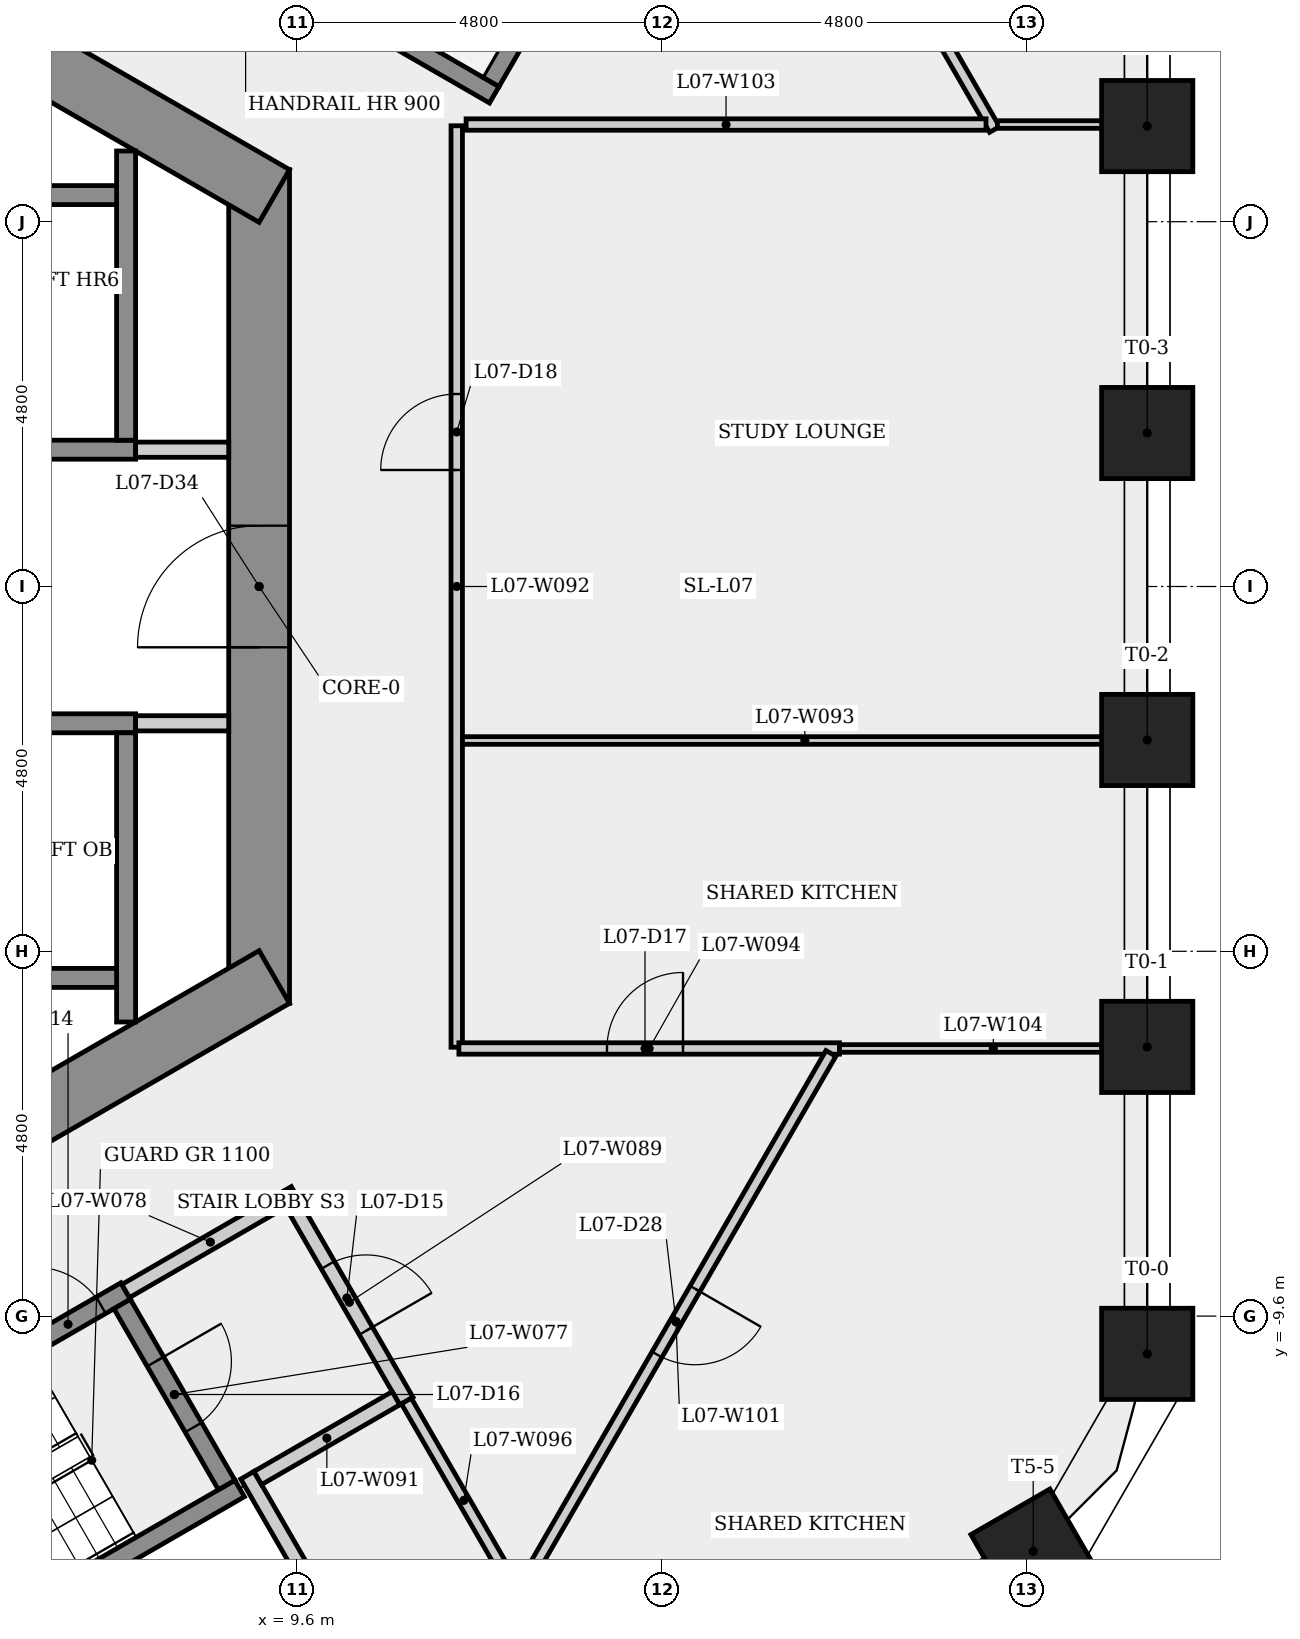
"""IFC4 building model, lengths in metres.
Left out: names, types, materials, properties, quantities, classifications, styles, units other than length and angle.
Written with IfcOpenShell. Run it as: python <this file> out.ifc"""

import sys

from ifc_helpers import new_model, si_unit, direction, frame, frame_2d, origin, origin_2d, place, context, subcontext, project, spatial, rectangle, extrude, element, fill, save


model = new_model("IFC4")
c1 = context("Model", 3, precision=1e-05, world=origin(), true_north=direction((0.0, 1.0)))
c2 = subcontext(c1, "Body", "Model", "MODEL_VIEW")
j1 = project(units=[si_unit("LENGTHUNIT", "METRE"), si_unit("PLANEANGLEUNIT", "RADIAN")], contexts=[c1])
p1 = place(None, origin())
s1 = spatial("IfcSite", under=j1, at=p1, CompositionType="ELEMENT")
p2 = place(p1, origin())
s2 = spatial("IfcBuilding", under=s1, at=p2, CompositionType="ELEMENT")
p3 = place(p2, frame((0.0, 0.0, 32.3)))
s3 = spatial("IfcBuildingStorey", under=s2, at=p3, CompositionType="ELEMENT", Elevation=32.3)
p4 = place(p3, frame((9.1, -5.485, 0.0), z_axis=(0.0, 0.0, 1.0), x_axis=(0.0, 1.0, 0.0)))
e1 = element("IfcWall", 1, at=p4, inside=s3, PredefinedType="SHEAR", context=c2, shape_type="SweptSolid", body=[
    extrude(rectangle(XDim=10.97, YDim=0.8, at=frame_2d((5.485, 0.0))), origin(), (0.0, 0.0, 1.0), 3.4),
])
p5 = place(p4, frame((4.685, 0.0, 0.0)))
e2 = element("IfcOpeningElement", 2, at=p5, cuts=e1, PredefinedType="OPENING", context=c2, shape_type="SweptSolid", body=[
    extrude(rectangle(XDim=1.6, YDim=2.1, at=frame_2d((0.8, 1.05))), frame((0.0, 0.41, 0.0), z_axis=(0.0, -1.0, 0.0), x_axis=(1.0, 0.0, 0.0)), (0.0, 0.0, 1.0), 0.82),
])
p6 = place(p3, frame((9.3, 5.138, 0.0), z_axis=(0.0, 0.0, 1.0), x_axis=(-0.866023993627, 0.500002442456, 0.0)))
e3 = element("IfcWall", 3, at=p6, inside=s3, PredefinedType="SHEAR", context=c2, shape_type="SweptSolid", body=[
    extrude(rectangle(XDim=10.97, YDim=0.8, at=frame_2d((5.485, 0.0))), origin(), (0.0, 0.0, 1.0), 3.4),
])
p7 = place(p6, frame((5.509, 0.0, 0.0)))
e4 = element("IfcOpeningElement", 4, at=p7, cuts=e3, PredefinedType="OPENING", context=c2, shape_type="SweptSolid", body=[
    extrude(rectangle(XDim=0.9, YDim=2.1, at=frame_2d((0.45, 1.05))), frame((0.0, 0.41, 0.0), z_axis=(0.0, -1.0, 0.0), x_axis=(1.0, 0.0, 0.0)), (0.0, 0.0, 1.0), 0.82),
])
p8 = place(p3, frame((-0.2, -10.623, 0.0), z_axis=(0.0, 0.0, 1.0), x_axis=(0.866023993627, 0.500002442456, 0.0)))
e5 = element("IfcWall", 5, at=p8, inside=s3, PredefinedType="SHEAR", context=c2, shape_type="SweptSolid", body=[
    extrude(rectangle(XDim=10.97, YDim=0.8, at=frame_2d((5.485, 0.0))), origin(), (0.0, 0.0, 1.0), 3.4),
])
p9 = place(p8, frame((4.914, 0.0, 0.0)))
e6 = element("IfcOpeningElement", 6, at=p9, cuts=e5, PredefinedType="OPENING", context=c2, shape_type="SweptSolid", body=[
    extrude(rectangle(XDim=0.9, YDim=2.1, at=frame_2d((0.45, 1.05))), frame((0.0, 0.41, 0.0), z_axis=(0.0, -1.0, 0.0), x_axis=(1.0, 0.0, 0.0)), (0.0, 0.0, 1.0), 0.82),
])
for number, where, z_axis, x_axis in (
    (7, (20.785, -10.097, 0.0), (0.0, 0.0, 1.0), (1.0, 0.0, 0.0)),
    (8, (20.785, -6.058, 0.0), (0.0, 0.0, 1.0), (1.0, 0.0, 0.0)),
    (9, (20.785, -2.019, 0.0), (0.0, 0.0, 1.0), (1.0, 0.0, 0.0)),
    (10, (20.785, 2.019, 0.0), (0.0, 0.0, 1.0), (1.0, 0.0, 0.0)),
    (11, (20.785, 6.058, 0.0), (0.0, 0.0, 1.0), (1.0, 0.0, 0.0)),
    (12, (19.285, -12.695, 0.0), (0.0, 0.0, 1.0), (0.5, -0.866, 0.0)),
):
    element("IfcColumn", number, at=place(p3, frame(where, z_axis=z_axis, x_axis=x_axis)), inside=s3, PredefinedType="COLUMN", context=c2, shape_type="SweptSolid", body=[
        extrude(rectangle(XDim=1.2, YDim=1.2, at=origin_2d()), origin(), (0.0, 0.0, 1.0), 3.4),
    ])
p10 = place(p3, frame((-7.475, 1.8, 0.0), z_axis=(0.0, 0.0, 1.0), x_axis=(1.0, 0.0, 0.0)))
e13 = element("IfcWall", 13, at=p10, inside=s3, PredefinedType="SHEAR", context=c2, shape_type="SweptSolid", body=[
    extrude(rectangle(XDim=14.95, YDim=0.25, at=frame_2d((7.475, 0.0))), origin(), (0.0, 0.0, 1.0), 3.05),
])
for number, where, z_axis, x_axis in (
    (14, (-7.225, 5.15, 0.0), (0.0, 0.0, 1.0), (1.0, 0.0, 0.0)),
    (15, (-7.225, -5.15, 0.0), (0.0, 0.0, 1.0), (1.0, 0.0, 0.0)),
):
    element("IfcWall", number, at=place(p3, frame(where, z_axis=z_axis, x_axis=x_axis)), inside=s3, PredefinedType="SHEAR", context=c2, shape_type="SweptSolid", body=[
        extrude(rectangle(XDim=14.7, YDim=0.25, at=frame_2d((7.35, 0.0))), origin(), (0.0, 0.0, 1.0), 3.05),
    ])
p11 = place(p3, frame((-7.225, -1.8, 0.0), z_axis=(0.0, 0.0, 1.0), x_axis=(1.0, 0.0, 0.0)))
e16 = element("IfcWall", 16, at=p11, inside=s3, PredefinedType="SHEAR", context=c2, shape_type="SweptSolid", body=[
    extrude(rectangle(XDim=14.7, YDim=0.25, at=frame_2d((7.35, 0.0))), origin(), (0.0, 0.0, 1.0), 3.05),
])
p12 = place(p11, frame((0.597, 0.0, 0.0)))
e17 = element("IfcOpeningElement", 17, at=p12, cuts=e16, PredefinedType="OPENING", context=c2, shape_type="SweptSolid", body=[
    extrude(rectangle(XDim=1.1, YDim=2.1, at=frame_2d((0.55, 1.05))), frame((0.0, 0.135, 0.0), z_axis=(0.0, -1.0, 0.0), x_axis=(1.0, 0.0, 0.0)), (0.0, 0.0, 1.0), 0.27),
])
p13 = place(p11, frame((3.0, 0.0, 0.0)))
e18 = element("IfcOpeningElement", 18, at=p13, cuts=e16, PredefinedType="OPENING", context=c2, shape_type="SweptSolid", body=[
    extrude(rectangle(XDim=1.1, YDim=2.1, at=frame_2d((0.55, 1.05))), frame((0.0, 0.135, 0.0), z_axis=(0.0, -1.0, 0.0), x_axis=(1.0, 0.0, 0.0)), (0.0, 0.0, 1.0), 0.27),
])
p14 = place(p11, frame((5.45, 0.0, 0.0)))
e19 = element("IfcOpeningElement", 19, at=p14, cuts=e16, PredefinedType="OPENING", context=c2, shape_type="SweptSolid", body=[
    extrude(rectangle(XDim=1.1, YDim=2.1, at=frame_2d((0.55, 1.05))), frame((0.0, 0.135, 0.0), z_axis=(0.0, -1.0, 0.0), x_axis=(1.0, 0.0, 0.0)), (0.0, 0.0, 1.0), 0.27),
])
p15 = place(p11, frame((7.9, 0.0, 0.0)))
e20 = element("IfcOpeningElement", 20, at=p15, cuts=e16, PredefinedType="OPENING", context=c2, shape_type="SweptSolid", body=[
    extrude(rectangle(XDim=1.1, YDim=2.1, at=frame_2d((0.55, 1.05))), frame((0.0, 0.135, 0.0), z_axis=(0.0, -1.0, 0.0), x_axis=(1.0, 0.0, 0.0)), (0.0, 0.0, 1.0), 0.27),
])
p16 = place(p11, frame((10.35, 0.0, 0.0)))
e21 = element("IfcOpeningElement", 21, at=p16, cuts=e16, PredefinedType="OPENING", context=c2, shape_type="SweptSolid", body=[
    extrude(rectangle(XDim=1.1, YDim=2.1, at=frame_2d((0.55, 1.05))), frame((0.0, 0.135, 0.0), z_axis=(0.0, -1.0, 0.0), x_axis=(1.0, 0.0, 0.0)), (0.0, 0.0, 1.0), 0.27),
])
p17 = place(p3, frame((1.585, -12.595, 0.0), z_axis=(0.0, 0.0, 1.0), x_axis=(0.866036417653, 0.499980922934, 0.0)))
e22 = element("IfcWall", 22, at=p17, inside=s3, PredefinedType="SHEAR", context=c2, shape_type="SweptSolid", body=[
    extrude(rectangle(XDim=6.65, YDim=0.25, at=frame_2d((3.325, 0.0))), origin(), (0.0, 0.0, 1.0), 3.05),
])
p18 = place(p17, frame((5.275, 0.0, 0.0)))
e23 = element("IfcOpeningElement", 23, at=p18, cuts=e22, PredefinedType="OPENING", context=c2, shape_type="SweptSolid", body=[
    extrude(rectangle(XDim=1.0, YDim=2.1, at=frame_2d((0.5, 1.05))), frame((0.0, 0.135, 0.0), z_axis=(0.0, -1.0, 0.0), x_axis=(1.0, 0.0, 0.0)), (0.0, 0.0, 1.0), 0.27),
])
p19 = place(p3, frame((3.301, -15.068, 0.0), z_axis=(0.0, 0.0, 1.0), x_axis=(0.866035036182, 0.499983315828, 0.0)))
e24 = element("IfcWall", 24, at=p19, inside=s3, PredefinedType="SHEAR", context=c2, shape_type="SweptSolid", body=[
    extrude(rectangle(XDim=6.4, YDim=0.25, at=frame_2d((3.2, 0.0))), origin(), (0.0, 0.0, 1.0), 3.05),
])
p20 = place(p3, frame((7.298, -9.441, 0.0), z_axis=(0.0, 0.0, 1.0), x_axis=(0.500034990121, -0.866005201286, 0.0)))
e25 = element("IfcWall", 25, at=p20, inside=s3, PredefinedType="SHEAR", context=c2, shape_type="SweptSolid", body=[
    extrude(rectangle(XDim=2.75, YDim=0.25, at=frame_2d((1.375, 0.0))), origin(), (0.0, 0.0, 1.0), 3.05),
])
p21 = place(p20, frame((0.875, 0.0, 0.0)))
e26 = element("IfcOpeningElement", 26, at=p21, cuts=e25, PredefinedType="OPENING", context=c2, shape_type="SweptSolid", body=[
    extrude(rectangle(XDim=1.0, YDim=2.1, at=frame_2d((0.5, 1.05))), frame((0.0, 0.135, 0.0), z_axis=(0.0, -1.0, 0.0), x_axis=(1.0, 0.0, 0.0)), (0.0, 0.0, 1.0), 0.27),
])
p22 = place(p3, frame((7.344, -9.27, 0.0), z_axis=(0.0, 0.0, 1.0), x_axis=(0.866005588531, 0.500034319456, 0.0)))
e27 = element("IfcWall", 27, at=p22, inside=s3, PredefinedType="PARTITIONING", context=c2, shape_type="SweptSolid", body=[
    extrude(rectangle(XDim=2.575, YDim=0.2, at=frame_2d((1.288, 0.0))), origin(), (0.0, 0.0, 1.0), 3.05),
])
p23 = place(p3, frame((7.475, 1.8, 0.0), z_axis=(0.0, 0.0, 1.0), x_axis=(1.0, 0.0, 0.0)))
e28 = element("IfcWall", 28, at=p23, inside=s3, PredefinedType="PARTITIONING", context=c2, shape_type="SweptSolid", body=[
    extrude(rectangle(XDim=1.225, YDim=0.2, at=frame_2d((0.613, 0.0))), origin(), (0.0, 0.0, 1.0), 3.05),
])
for number, where, z_axis, x_axis in (
    (29, (7.35, -1.925, 0.0), (0.0, 0.0, 1.0), (0.0, -1.0, 0.0)),
    (30, (7.35, 5.73, 0.0), (0.0, 0.0, 1.0), (0.0, -1.0, 0.0)),
):
    element("IfcWall", number, at=place(p3, frame(where, z_axis=z_axis, x_axis=x_axis)), inside=s3, PredefinedType="SHEAR", context=c2, shape_type="SweptSolid", body=[
        extrude(rectangle(XDim=3.805, YDim=0.25, at=frame_2d((1.903, 0.0))), origin(), (0.0, 0.0, 1.0), 3.05),
    ])
p24 = place(p3, frame((8.7, -1.8, 0.0), z_axis=(0.0, 0.0, 1.0), x_axis=(-1.0, 0.0, 0.0)))
e31 = element("IfcWall", 31, at=p24, inside=s3, PredefinedType="PARTITIONING", context=c2, shape_type="SweptSolid", body=[
    extrude(rectangle(XDim=1.225, YDim=0.2, at=frame_2d((0.613, 0.0))), origin(), (0.0, 0.0, 1.0), 3.05),
])
p25 = place(p3, frame((8.945, -11.694, 0.0), z_axis=(0.0, 0.0, 1.0), x_axis=(0.500062241894, -0.865989465428, 0.0)))
e32 = element("IfcWall", 32, at=p25, inside=s3, PredefinedType="PLUMBINGWALL", context=c2, shape_type="SweptSolid", body=[
    extrude(rectangle(XDim=3.4, YDim=0.2, at=frame_2d((1.7, 0.0))), origin(), (0.0, 0.0, 1.0), 3.05),
])
p26 = place(p3, frame((9.537, -8.119, 0.0), z_axis=(0.0, 0.0, 1.0), x_axis=(0.499990139034, -0.866031096941, 0.0)))
e33 = element("IfcWall", 33, at=p26, inside=s3, PredefinedType="PARTITIONING", context=c2, shape_type="SweptSolid", body=[
    extrude(rectangle(XDim=3.0, YDim=0.2, at=frame_2d((1.5, 0.0))), origin(), (0.0, 0.0, 1.0), 3.05),
])
p27 = place(p26, frame((0.935, 0.0, 0.0)))
e34 = element("IfcOpeningElement", 34, at=p27, cuts=e33, PredefinedType="OPENING", context=c2, shape_type="SweptSolid", body=[
    extrude(rectangle(XDim=1.0, YDim=2.1, at=frame_2d((0.5, 1.05))), frame((0.0, 0.11, 0.0), z_axis=(0.0, -1.0, 0.0), x_axis=(1.0, 0.0, 0.0)), (0.0, 0.0, 1.0), 0.22),
])
p28 = place(p3, frame((10.901, -10.681, 0.0), z_axis=(0.0, 0.0, 1.0), x_axis=(-0.866009402589, -0.500027713859, 0.0)))
e35 = element("IfcWall", 35, at=p28, inside=s3, PredefinedType="PARTITIONING", context=c2, shape_type="SweptSolid", body=[
    extrude(rectangle(XDim=2.1, YDim=0.2, at=frame_2d((1.05, 0.0))), origin(), (0.0, 0.0, 1.0), 3.05),
])
p29 = place(p3, frame((11.7, -6.062, 0.0), z_axis=(0.0, 0.0, 1.0), x_axis=(0.0, 1.0, 0.0)))
e36 = element("IfcWall", 36, at=p29, inside=s3, PredefinedType="PARTITIONING", context=c2, shape_type="SweptSolid", body=[
    extrude(rectangle(XDim=12.125, YDim=0.15, at=frame_2d((6.062, 0.0))), origin(), (0.0, 0.0, 1.0), 3.05),
])
p30 = place(p29, frame((7.595, 0.0, 0.0)))
e37 = element("IfcOpeningElement", 37, at=p30, cuts=e36, PredefinedType="OPENING", context=c2, shape_type="SweptSolid", body=[
    extrude(rectangle(XDim=1.0, YDim=2.1, at=frame_2d((0.5, 1.05))), frame((0.0, 0.085, 0.0), z_axis=(0.0, -1.0, 0.0), x_axis=(1.0, 0.0, 0.0)), (0.0, 0.0, 1.0), 0.17),
])
p31 = place(p3, frame((11.775, -2.026, 0.0), z_axis=(0.0, 0.0, 1.0), x_axis=(1.0, 0.0, 0.0)))
e38 = element("IfcWall", 38, at=p31, inside=s3, PredefinedType="PARTITIONING", context=c2, shape_type="SweptSolid", body=[
    extrude(rectangle(XDim=9.01, YDim=0.1, at=frame_2d((4.505, 0.0))), origin(), (0.0, 0.0, 1.0), 3.05),
])
p32 = place(p3, frame((11.728, -6.079, 0.0), z_axis=(0.0, 0.0, 1.0), x_axis=(1.0, 0.0, 0.0)))
e39 = element("IfcWall", 39, at=p32, inside=s3, PredefinedType="PARTITIONING", context=c2, shape_type="SweptSolid", body=[
    extrude(rectangle(XDim=5.007, YDim=0.15, at=frame_2d((2.503, 0.0))), origin(), (0.0, 0.0, 1.0), 3.05),
])
p33 = place(p32, frame((1.948, 0.0, 0.0)))
e40 = element("IfcOpeningElement", 40, at=p33, cuts=e39, PredefinedType="OPENING", context=c2, shape_type="SweptSolid", body=[
    extrude(rectangle(XDim=1.0, YDim=2.1, at=frame_2d((0.5, 1.05))), frame((0.0, 0.085, 0.0), z_axis=(0.0, -1.0, 0.0), x_axis=(1.0, 0.0, 0.0)), (0.0, 0.0, 1.0), 0.17),
])
p34 = place(p3, frame((12.194, 6.47, 0.0), z_axis=(0.0, 0.0, 1.0), x_axis=(-0.866025499775, 0.499999833739, 0.0)))
e41 = element("IfcWall", 41, at=p34, inside=s3, PredefinedType="SHEAR", context=c2, shape_type="SweptSolid", body=[
    extrude(rectangle(XDim=6.4, YDim=0.25, at=frame_2d((3.2, 0.0))), origin(), (0.0, 0.0, 1.0), 3.05),
])
p35 = place(p34, frame((5.25, 0.0, 0.0)))
e42 = element("IfcOpeningElement", 42, at=p35, cuts=e41, PredefinedType="OPENING", context=c2, shape_type="SweptSolid", body=[
    extrude(rectangle(XDim=1.0, YDim=2.1, at=frame_2d((0.5, 1.05))), frame((0.0, 0.135, 0.0), z_axis=(0.0, -1.0, 0.0), x_axis=(1.0, 0.0, 0.0)), (0.0, 0.0, 1.0), 0.27),
])
p36 = place(p3, frame((12.547, -13.332, 0.0), z_axis=(0.0, 0.0, 1.0), x_axis=(-0.499965068118, 0.866045570776, 0.0)))
e43 = element("IfcWall", 43, at=p36, inside=s3, PredefinedType="PARTITIONING", context=c2, shape_type="SweptSolid", body=[
    extrude(rectangle(XDim=3.02, YDim=0.15, at=frame_2d((1.51, 0.0))), origin(), (0.0, 0.0, 1.0), 3.05),
])
p37 = place(p3, frame((13.523, 9.022, 0.0), z_axis=(0.0, 0.0, 1.0), x_axis=(-0.500034990121, -0.866005201286, 0.0)))
e44 = element("IfcWall", 44, at=p37, inside=s3, PredefinedType="SHEAR", context=c2, shape_type="SweptSolid", body=[
    extrude(rectangle(XDim=2.75, YDim=0.25, at=frame_2d((1.375, 0.0))), origin(), (0.0, 0.0, 1.0), 3.05),
])
p38 = place(p3, frame((15.318, 12.002, 0.0), z_axis=(0.0, 0.0, 1.0), x_axis=(0.500015831195, -0.866016263447, 0.0)))
e45 = element("IfcWall", 45, at=p38, inside=s3, PredefinedType="PARTITIONING", context=c2, shape_type="SweptSolid", body=[
    extrude(rectangle(XDim=6.915, YDim=0.15, at=frame_2d((3.458, 0.0))), origin(), (0.0, 0.0, 1.0), 3.05),
])
p39 = place(p38, frame((2.903, 0.0, 0.0)))
e46 = element("IfcOpeningElement", 46, at=p39, cuts=e45, PredefinedType="OPENING", context=c2, shape_type="SweptSolid", body=[
    extrude(rectangle(XDim=1.0, YDim=2.1, at=frame_2d((0.5, 1.05))), frame((0.0, 0.085, 0.0), z_axis=(0.0, -1.0, 0.0), x_axis=(1.0, 0.0, 0.0)), (0.0, 0.0, 1.0), 0.17),
])
p40 = place(p3, frame((16.623, -6.144, 0.0), z_axis=(0.0, 0.0, 1.0), x_axis=(-0.500001609966, -0.866024474268, 0.0)))
e47 = element("IfcWall", 47, at=p40, inside=s3, PredefinedType="PARTITIONING", context=c2, shape_type="SweptSolid", body=[
    extrude(rectangle(XDim=8.151, YDim=0.15, at=frame_2d((4.075, 0.0))), origin(), (0.0, 0.0, 1.0), 3.05),
])
p41 = place(p40, frame((3.575, 0.0, 0.0)))
e48 = element("IfcOpeningElement", 48, at=p41, cuts=e47, PredefinedType="OPENING", context=c2, shape_type="SweptSolid", body=[
    extrude(rectangle(XDim=1.0, YDim=2.1, at=frame_2d((0.5, 1.05))), frame((0.0, 0.085, 0.0), z_axis=(0.0, -1.0, 0.0), x_axis=(1.0, 0.0, 0.0)), (0.0, 0.0, 1.0), 0.17),
])
p42 = place(p3, frame((18.813, 6.079, 0.0), z_axis=(0.0, 0.0, 1.0), x_axis=(1.0, 0.0, 0.0)))
e49 = element("IfcWall", 49, at=p42, inside=s3, PredefinedType="PARTITIONING", context=c2, shape_type="SweptSolid", body=[
    extrude(rectangle(XDim=1.971, YDim=0.1, at=frame_2d((0.986, 0.0))), origin(), (0.0, 0.0, 1.0), 3.05),
])
p43 = place(p3, frame((18.664, 6.079, 0.0), z_axis=(0.0, 0.0, 1.0), x_axis=(-1.0, 0.0, 0.0)))
e50 = element("IfcWall", 50, at=p43, inside=s3, PredefinedType="PARTITIONING", context=c2, shape_type="SweptSolid", body=[
    extrude(rectangle(XDim=6.84, YDim=0.15, at=frame_2d((3.42, 0.0))), origin(), (0.0, 0.0, 1.0), 3.05),
])
p44 = place(p3, frame((20.785, -6.079, 0.0), z_axis=(0.0, 0.0, 1.0), x_axis=(-1.0, 0.0, 0.0)))
e51 = element("IfcWall", 51, at=p44, inside=s3, PredefinedType="PARTITIONING", context=c2, shape_type="SweptSolid", body=[
    extrude(rectangle(XDim=4.05, YDim=0.1, at=frame_2d((2.025, 0.0))), origin(), (0.0, 0.0, 1.0), 3.05),
])
p45 = place(p18, origin())
e52 = element("IfcDoor", 52, at=p45, inside=s3, OperationType="SINGLE_SWING_LEFT", PredefinedType="DOOR", context=c2, shape_type="SweptSolid", body=[
    extrude(rectangle(XDim=1.0, YDim=2.1, at=frame_2d((0.5, 1.05))), frame((0.0, 0.025, 0.0), z_axis=(0.0, -1.0, 0.0), x_axis=(1.0, 0.0, 0.0)), (0.0, 0.0, 1.0), 0.05),
])
fill(e23, e52)
p46 = place(p27, origin())
e53 = element("IfcDoor", 53, at=p46, inside=s3, OperationType="SINGLE_SWING_RIGHT", PredefinedType="DOOR", context=c2, shape_type="SweptSolid", body=[
    extrude(rectangle(XDim=1.0, YDim=2.1, at=frame_2d((0.5, 1.05))), frame((0.0, 0.025, 0.0), z_axis=(0.0, -1.0, 0.0), x_axis=(1.0, 0.0, 0.0)), (0.0, 0.0, 1.0), 0.05),
])
fill(e34, e53)
p47 = place(p21, origin())
e54 = element("IfcDoor", 54, at=p47, inside=s3, OperationType="SINGLE_SWING_LEFT", PredefinedType="DOOR", context=c2, shape_type="SweptSolid", body=[
    extrude(rectangle(XDim=1.0, YDim=2.1, at=frame_2d((0.5, 1.05))), frame((0.0, 0.025, 0.0), z_axis=(0.0, -1.0, 0.0), x_axis=(1.0, 0.0, 0.0)), (0.0, 0.0, 1.0), 0.05),
])
fill(e26, e54)
p48 = place(p33, origin())
e55 = element("IfcDoor", 55, at=p48, inside=s3, OperationType="SINGLE_SWING_RIGHT", PredefinedType="DOOR", context=c2, shape_type="SweptSolid", body=[
    extrude(rectangle(XDim=1.0, YDim=2.1, at=frame_2d((0.5, 1.05))), frame((0.0, 0.025, 0.0), z_axis=(0.0, -1.0, 0.0), x_axis=(1.0, 0.0, 0.0)), (0.0, 0.0, 1.0), 0.05),
])
fill(e40, e55)
p49 = place(p30, origin())
e56 = element("IfcDoor", 56, at=p49, inside=s3, OperationType="SINGLE_SWING_LEFT", PredefinedType="DOOR", context=c2, shape_type="SweptSolid", body=[
    extrude(rectangle(XDim=1.0, YDim=2.1, at=frame_2d((0.5, 1.05))), frame((0.0, 0.025, 0.0), z_axis=(0.0, -1.0, 0.0), x_axis=(1.0, 0.0, 0.0)), (0.0, 0.0, 1.0), 0.05),
])
fill(e37, e56)
p50 = place(p41, origin())
e57 = element("IfcDoor", 57, at=p50, inside=s3, OperationType="SINGLE_SWING_LEFT", PredefinedType="DOOR", context=c2, shape_type="SweptSolid", body=[
    extrude(rectangle(XDim=1.0, YDim=2.1, at=frame_2d((0.5, 1.05))), frame((0.0, 0.025, 0.0), z_axis=(0.0, -1.0, 0.0), x_axis=(1.0, 0.0, 0.0)), (0.0, 0.0, 1.0), 0.05),
])
fill(e48, e57)
p51 = place(p5, origin())
e58 = element("IfcDoor", 58, at=p51, inside=s3, OperationType="SINGLE_SWING_LEFT", PredefinedType="DOOR", context=c2, shape_type="SweptSolid", body=[
    extrude(rectangle(XDim=1.6, YDim=2.1, at=frame_2d((0.8, 1.05))), frame((0.0, 0.025, 0.0), z_axis=(0.0, -1.0, 0.0), x_axis=(1.0, 0.0, 0.0)), (0.0, 0.0, 1.0), 0.05),
])
fill(e2, e58)
save(model, sys.argv[1])
